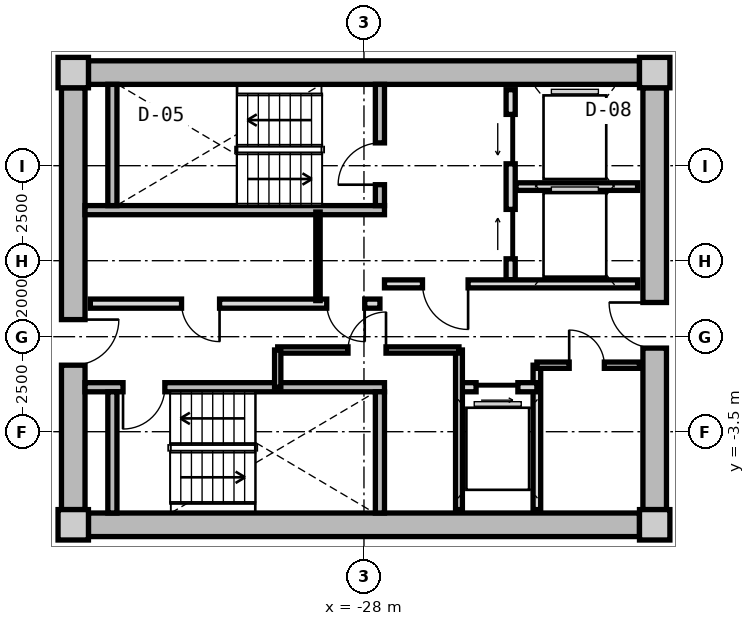
"""IFC4 building model, lengths in metres.
Left out: names, types, materials, properties, quantities, classifications, styles, units other than length and angle.
Written with IfcOpenShell. Run it as: python <this file> out.ifc"""

import sys

from ifc_helpers import new_model, si_unit, direction, frame, frame_2d, origin, origin_2d, place, context, subcontext, project, spatial, rectangle, extrude, source, transform, mapped, element, fill, save


model = new_model("IFC4")
c1 = context("Model", 3, precision=1e-05, world=origin(), true_north=direction((0.0, 1.0)))
c2 = subcontext(c1, "Body", "Model", "MODEL_VIEW")
j1 = project(units=[si_unit("LENGTHUNIT", "METRE"), si_unit("PLANEANGLEUNIT", "RADIAN")], contexts=[c1])
p1 = place(None, origin())
s1 = spatial("IfcSite", under=j1, at=p1, CompositionType="ELEMENT")
p2 = place(p1, origin())
s2 = spatial("IfcBuilding", under=s1, at=p2, CompositionType="ELEMENT")
p3 = place(p2, frame((0.0, 0.0, 173.95)))
s3 = spatial("IfcBuildingStorey", under=s2, at=p3, CompositionType="ELEMENT", Elevation=173.95)
m1 = source(origin(), c2, "Body", "SweptSolid", [
    extrude(rectangle(XDim=0.8, YDim=0.8, at=origin_2d()), origin(), (0.0, 0.0, 1.0), 3.05),
])
for number, where, z_axis, x_axis in (
    (1, (-35.65, -5.95, 0.0), (0.0, 0.0, 1.0), (1.0, 0.0, 0.0)),
    (2, (-20.35, -5.95, 0.0), (0.0, 0.0, 1.0), (1.0, 0.0, 0.0)),
    (3, (-20.35, 5.95, 0.0), (0.0, 0.0, 1.0), (1.0, 0.0, 0.0)),
    (4, (-35.65, 5.95, 0.0), (0.0, 0.0, 1.0), (1.0, 0.0, 0.0)),
):
    element("IfcColumn", number, at=place(p3, frame(where, z_axis=z_axis, x_axis=x_axis)), inside=s3, PredefinedType="COLUMN", context=c2, shape_type="MappedRepresentation", body=[
        mapped(m1, transform((0.0, 0.0, 0.0), x_axis=(1.0, 0.0, 0.0), y_axis=(0.0, 1.0, 0.0), z_axis=(0.0, 0.0, 1.0), scale=1.0)),
    ])
m2 = source(origin(), c2, "Body", "SweptSolid", [
    extrude(rectangle(XDim=14.5, YDim=0.62, at=frame_2d((7.25, 0.0))), origin(), (0.0, 0.0, 1.0), 2.81),
])
for number, where, z_axis, x_axis in (
    (5, (-35.25, 5.95, 0.0), (0.0, 0.0, 1.0), (1.0, 0.0, 0.0)),
    (6, (-20.75, -5.95, 0.0), (0.0, 0.0, 1.0), (-1.0, 0.0, 0.0)),
):
    element("IfcWall", number, at=place(p3, frame(where, z_axis=z_axis, x_axis=x_axis)), inside=s3, PredefinedType="SHEAR", context=c2, shape_type="MappedRepresentation", body=[
        mapped(m2, transform((0.0, 0.0, 0.0), x_axis=(1.0, 0.0, 0.0), y_axis=(0.0, 1.0, 0.0), z_axis=(0.0, 0.0, 1.0), scale=1.0)),
    ])
m3 = source(origin(), c2, "Body", "SweptSolid", [
    extrude(rectangle(XDim=11.1, YDim=0.62, at=frame_2d((5.55, 0.0))), origin(), (0.0, 0.0, 1.0), 2.81),
])
p4 = place(p3, frame((-35.65, -5.55, 0.0), z_axis=(0.0, 0.0, 1.0), x_axis=(0.0, 1.0, 0.0)))
e7 = element("IfcWall", 7, at=p4, inside=s3, PredefinedType="SHEAR", context=c2, shape_type="MappedRepresentation", body=[
    mapped(m3, transform((0.0, 0.0, 0.0), x_axis=(1.0, 0.0, 0.0), y_axis=(0.0, 1.0, 0.0), z_axis=(0.0, 0.0, 1.0), scale=1.0)),
])
p5 = place(p4, frame((3.8, 0.0, 0.0)))
e8 = element("IfcOpeningElement", 8, at=p5, cuts=e7, PredefinedType="OPENING", context=c2, shape_type="SweptSolid", body=[
    extrude(rectangle(XDim=1.2, YDim=2.15, at=frame_2d((0.6, 1.075))), frame((0.0, 0.32, 0.0), z_axis=(0.0, -1.0, 0.0), x_axis=(1.0, 0.0, 0.0)), (0.0, 0.0, 1.0), 0.64),
])
p6 = place(p3, frame((-20.35, 5.55, 0.0), z_axis=(0.0, 0.0, 1.0), x_axis=(0.0, -1.0, 0.0)))
e9 = element("IfcWall", 9, at=p6, inside=s3, PredefinedType="SHEAR", context=c2, shape_type="MappedRepresentation", body=[
    mapped(m3, transform((0.0, 0.0, 0.0), x_axis=(1.0, 0.0, 0.0), y_axis=(0.0, 1.0, 0.0), z_axis=(0.0, 0.0, 1.0), scale=1.0)),
])
p7 = place(p6, frame((5.65, 0.0, 0.0)))
e10 = element("IfcOpeningElement", 10, at=p7, cuts=e9, PredefinedType="OPENING", context=c2, shape_type="SweptSolid", body=[
    extrude(rectangle(XDim=1.2, YDim=2.15, at=frame_2d((0.6, 1.075))), frame((0.0, 0.32, 0.0), z_axis=(0.0, -1.0, 0.0), x_axis=(1.0, 0.0, 0.0)), (0.0, 0.0, 1.0), 0.64),
])
m4 = source(origin(), c2, "Body", "SweptSolid", [
    extrude(rectangle(XDim=7.88, YDim=0.24, at=frame_2d((3.94, 0.0))), origin(), (0.0, 0.0, 1.0), 2.81),
])
p8 = place(p3, frame((-35.34, 2.33, 0.0), z_axis=(0.0, 0.0, 1.0), x_axis=(1.0, 0.0, 0.0)))
e11 = element("IfcWall", 11, at=p8, inside=s3, PredefinedType="PARTITIONING", context=c2, shape_type="MappedRepresentation", body=[
    mapped(m4, transform((0.0, 0.0, 0.0), x_axis=(1.0, 0.0, 0.0), y_axis=(0.0, 1.0, 0.0), z_axis=(0.0, 0.0, 1.0), scale=1.0)),
])
m5 = source(origin(), c2, "Body", "SweptSolid", [
    extrude(rectangle(XDim=3.19, YDim=0.24, at=frame_2d((1.595, 0.0))), origin(), (0.0, 0.0, 1.0), 2.81),
])
p9 = place(p3, frame((-34.62, 2.45, 0.0), z_axis=(0.0, 0.0, 1.0), x_axis=(0.0, 1.0, 0.0)))
e12 = element("IfcWall", 12, at=p9, inside=s3, PredefinedType="PARTITIONING", context=c2, shape_type="MappedRepresentation", body=[
    mapped(m5, transform((0.0, 0.0, 0.0), x_axis=(1.0, 0.0, 0.0), y_axis=(0.0, 1.0, 0.0), z_axis=(0.0, 0.0, 1.0), scale=1.0)),
])
p10 = place(p3, frame((-27.58, 2.45, 0.0), z_axis=(0.0, 0.0, 1.0), x_axis=(0.0, 1.0, 0.0)))
e13 = element("IfcWall", 13, at=p10, inside=s3, PredefinedType="PARTITIONING", context=c2, shape_type="MappedRepresentation", body=[
    mapped(m5, transform((0.0, 0.0, 0.0), x_axis=(1.0, 0.0, 0.0), y_axis=(0.0, 1.0, 0.0), z_axis=(0.0, 0.0, 1.0), scale=1.0)),
])
p11 = place(p10, frame((0.55, 0.0, 0.0)))
e14 = element("IfcOpeningElement", 14, at=p11, cuts=e13, PredefinedType="OPENING", context=c2, shape_type="SweptSolid", body=[
    extrude(rectangle(XDim=1.1, YDim=2.15, at=frame_2d((0.55, 1.075))), frame((0.0, 0.13, 0.0), z_axis=(0.0, -1.0, 0.0), x_axis=(1.0, 0.0, 0.0)), (0.0, 0.0, 1.0), 0.26),
])
p12 = place(p3, frame((-35.34, -2.33, 0.0), z_axis=(0.0, 0.0, 1.0), x_axis=(1.0, 0.0, 0.0)))
e15 = element("IfcWall", 15, at=p12, inside=s3, PredefinedType="PARTITIONING", context=c2, shape_type="MappedRepresentation", body=[
    mapped(m4, transform((0.0, 0.0, 0.0), x_axis=(1.0, 0.0, 0.0), y_axis=(0.0, 1.0, 0.0), z_axis=(0.0, 0.0, 1.0), scale=1.0)),
])
p13 = place(p12, frame((1.0, 0.0, 0.0)))
e16 = element("IfcOpeningElement", 16, at=p13, cuts=e15, PredefinedType="OPENING", context=c2, shape_type="SweptSolid", body=[
    extrude(rectangle(XDim=1.1, YDim=2.15, at=frame_2d((0.55, 1.075))), frame((0.0, 0.13, 0.0), z_axis=(0.0, -1.0, 0.0), x_axis=(1.0, 0.0, 0.0)), (0.0, 0.0, 1.0), 0.26),
])
for number, where, z_axis, x_axis in (
    (17, (-34.62, -5.64, 0.0), (0.0, 0.0, 1.0), (0.0, 1.0, 0.0)),
    (18, (-27.58, -5.64, 0.0), (0.0, 0.0, 1.0), (0.0, 1.0, 0.0)),
):
    element("IfcWall", number, at=place(p3, frame(where, z_axis=z_axis, x_axis=x_axis)), inside=s3, PredefinedType="PARTITIONING", context=c2, shape_type="MappedRepresentation", body=[
        mapped(m5, transform((0.0, 0.0, 0.0), x_axis=(1.0, 0.0, 0.0), y_axis=(0.0, 1.0, 0.0), z_axis=(0.0, 0.0, 1.0), scale=1.0)),
    ])
m6 = source(origin(), c2, "Body", "SweptSolid", [
    extrude(rectangle(XDim=5.0, YDim=0.24, at=frame_2d((2.5, 0.0))), origin(), (0.0, 0.0, 1.0), 2.795),
])
p14 = place(p3, frame((-24.14, 0.5, 0.0), z_axis=(0.0, 0.0, 1.0), x_axis=(0.0, 1.0, 0.0)))
e19 = element("IfcWall", 19, at=p14, inside=s3, PredefinedType="PARTITIONING", context=c2, shape_type="MappedRepresentation", body=[
    mapped(m6, transform((0.0, 0.0, 0.0), x_axis=(1.0, 0.0, 0.0), y_axis=(0.0, 1.0, 0.0), z_axis=(0.0, 0.0, 1.0), scale=1.0)),
])
p15 = place(p14, frame((3.05, 0.0, 0.0)))
e20 = element("IfcOpeningElement", 20, at=p15, cuts=e19, PredefinedType="OPENING", context=c2, shape_type="SweptSolid", body=[
    extrude(rectangle(XDim=1.3, YDim=2.2, at=frame_2d((0.65, 1.1))), frame((0.0, 0.13, 0.0), z_axis=(0.0, -1.0, 0.0), x_axis=(1.0, 0.0, 0.0)), (0.0, 0.0, 1.0), 0.26),
])
p16 = place(p14, frame((0.55, 0.0, 0.0)))
e21 = element("IfcOpeningElement", 21, at=p16, cuts=e19, PredefinedType="OPENING", context=c2, shape_type="SweptSolid", body=[
    extrude(rectangle(XDim=1.3, YDim=2.2, at=frame_2d((0.65, 1.1))), frame((0.0, 0.13, 0.0), z_axis=(0.0, -1.0, 0.0), x_axis=(1.0, 0.0, 0.0)), (0.0, 0.0, 1.0), 0.26),
])
m7 = source(origin(), c2, "Body", "SweptSolid", [
    extrude(rectangle(XDim=3.2, YDim=0.2, at=frame_2d((1.6, 0.0))), origin(), (0.0, 0.0, 1.0), 2.795),
])
p17 = place(p3, frame((-24.0, 2.95, 0.0), z_axis=(0.0, 0.0, 1.0), x_axis=(1.0, 0.0, 0.0)))
e22 = element("IfcWall", 22, at=p17, inside=s3, PredefinedType="PARTITIONING", context=c2, shape_type="MappedRepresentation", body=[
    mapped(m7, transform((0.0, 0.0, 0.0), x_axis=(1.0, 0.0, 0.0), y_axis=(0.0, 1.0, 0.0), z_axis=(0.0, 0.0, 1.0), scale=1.0)),
])
m8 = source(origin(), c2, "Body", "SweptSolid", [
    extrude(rectangle(XDim=6.66, YDim=0.21, at=frame_2d((3.33, 0.0))), origin(), (0.0, 0.0, 1.0), 2.795),
])
p18 = place(p3, frame((-27.46, 0.39, 0.0), z_axis=(0.0, 0.0, 1.0), x_axis=(1.0, 0.0, 0.0)))
e23 = element("IfcWall", 23, at=p18, inside=s3, PredefinedType="PARTITIONING", context=c2, shape_type="MappedRepresentation", body=[
    mapped(m8, transform((0.0, 0.0, 0.0), x_axis=(1.0, 0.0, 0.0), y_axis=(0.0, 1.0, 0.0), z_axis=(0.0, 0.0, 1.0), scale=1.0)),
])
p19 = place(p18, frame((1.0, 0.0, 0.0)))
e24 = element("IfcOpeningElement", 24, at=p19, cuts=e23, PredefinedType="OPENING", context=c2, shape_type="SweptSolid", body=[
    extrude(rectangle(XDim=1.2, YDim=2.15, at=frame_2d((0.6, 1.075))), frame((0.0, 0.115, 0.0), z_axis=(0.0, -1.0, 0.0), x_axis=(1.0, 0.0, 0.0)), (0.0, 0.0, 1.0), 0.23),
])
m9 = source(origin(), c2, "Body", "SweptSolid", [
    extrude(rectangle(XDim=7.62, YDim=0.24, at=frame_2d((3.81, 0.0))), origin(), (0.0, 0.0, 1.0), 2.795),
])
p20 = place(p3, frame((-35.2, -0.13, 0.0), z_axis=(0.0, 0.0, 1.0), x_axis=(1.0, 0.0, 0.0)))
e25 = element("IfcWall", 25, at=p20, inside=s3, PredefinedType="PARTITIONING", context=c2, shape_type="MappedRepresentation", body=[
    mapped(m9, transform((0.0, 0.0, 0.0), x_axis=(1.0, 0.0, 0.0), y_axis=(0.0, 1.0, 0.0), z_axis=(0.0, 0.0, 1.0), scale=1.0)),
])
p21 = place(p20, frame((6.22, 0.0, 0.0)))
e26 = element("IfcOpeningElement", 26, at=p21, cuts=e25, PredefinedType="OPENING", context=c2, shape_type="SweptSolid", body=[
    extrude(rectangle(XDim=1.0, YDim=2.1, at=frame_2d((0.5, 1.05))), frame((0.0, 0.13, 0.0), z_axis=(0.0, -1.0, 0.0), x_axis=(1.0, 0.0, 0.0)), (0.0, 0.0, 1.0), 0.26),
])
p22 = place(p20, frame((2.4, 0.0, 0.0)))
e27 = element("IfcOpeningElement", 27, at=p22, cuts=e25, PredefinedType="OPENING", context=c2, shape_type="SweptSolid", body=[
    extrude(rectangle(XDim=1.0, YDim=2.1, at=frame_2d((0.5, 1.05))), frame((0.0, 0.13, 0.0), z_axis=(0.0, -1.0, 0.0), x_axis=(1.0, 0.0, 0.0)), (0.0, 0.0, 1.0), 0.26),
])
m10 = source(origin(), c2, "Body", "SweptSolid", [
    extrude(rectangle(XDim=2.33, YDim=0.115, at=frame_2d((1.165, 0.0))), origin(), (0.0, 0.0, 1.0), 2.795),
])
p23 = place(p3, frame((-29.21, -0.05, 0.0), z_axis=(0.0, 0.0, 1.0), x_axis=(0.0, 1.0, 0.0)))
e28 = element("IfcWall", 28, at=p23, inside=s3, PredefinedType="PARTITIONING", context=c2, shape_type="MappedRepresentation", body=[
    mapped(m10, transform((0.0, 0.0, 0.0), x_axis=(1.0, 0.0, 0.0), y_axis=(0.0, 1.0, 0.0), z_axis=(0.0, 0.0, 1.0), scale=1.0)),
])
m11 = source(origin(), c2, "Body", "SweptSolid", [
    extrude(rectangle(XDim=3.8, YDim=0.2, at=frame_2d((1.9, 0.0))), origin(), (0.0, 0.0, 1.0), 2.795),
])
p24 = place(p3, frame((-23.45, -5.55, 0.0), z_axis=(0.0, 0.0, 1.0), x_axis=(0.0, 1.0, 0.0)))
e29 = element("IfcWall", 29, at=p24, inside=s3, PredefinedType="PARTITIONING", context=c2, shape_type="MappedRepresentation", body=[
    mapped(m11, transform((0.0, 0.0, 0.0), x_axis=(1.0, 0.0, 0.0), y_axis=(0.0, 1.0, 0.0), z_axis=(0.0, 0.0, 1.0), scale=1.0)),
])
m12 = source(origin(), c2, "Body", "SweptSolid", [
    extrude(rectangle(XDim=2.05, YDim=0.24, at=frame_2d((1.025, 0.0))), origin(), (0.0, 0.0, 1.0), 2.795),
])
p25 = place(p3, frame((-25.5, -2.33, 0.0), z_axis=(0.0, 0.0, 1.0), x_axis=(1.0, 0.0, 0.0)))
e30 = element("IfcWall", 30, at=p25, inside=s3, PredefinedType="PARTITIONING", context=c2, shape_type="MappedRepresentation", body=[
    mapped(m12, transform((0.0, 0.0, 0.0), x_axis=(1.0, 0.0, 0.0), y_axis=(0.0, 1.0, 0.0), z_axis=(0.0, 0.0, 1.0), scale=1.0)),
])
p26 = place(p25, frame((0.45, 0.0, 0.0)))
e31 = element("IfcOpeningElement", 31, at=p26, cuts=e30, PredefinedType="OPENING", context=c2, shape_type="SweptSolid", body=[
    extrude(rectangle(XDim=1.1, YDim=2.2, at=frame_2d((0.55, 1.1))), frame((0.0, 0.13, 0.0), z_axis=(0.0, -1.0, 0.0), x_axis=(1.0, 0.0, 0.0)), (0.0, 0.0, 1.0), 0.26),
])
m13 = source(origin(), c2, "Body", "SweptSolid", [
    extrude(rectangle(XDim=4.2, YDim=0.18, at=frame_2d((2.1, 0.0))), origin(), (0.0, 0.0, 1.0), 2.795),
])
p27 = place(p3, frame((-25.5, -5.55, 0.0), z_axis=(0.0, 0.0, 1.0), x_axis=(0.0, 1.0, 0.0)))
e32 = element("IfcWall", 32, at=p27, inside=s3, PredefinedType="PARTITIONING", context=c2, shape_type="MappedRepresentation", body=[
    mapped(m13, transform((0.0, 0.0, 0.0), x_axis=(1.0, 0.0, 0.0), y_axis=(0.0, 1.0, 0.0), z_axis=(0.0, 0.0, 1.0), scale=1.0)),
])
m14 = source(origin(), c2, "Body", "SweptSolid", [
    extrude(rectangle(XDim=4.77, YDim=0.165, at=frame_2d((2.385, 0.0))), origin(), (0.0, 0.0, 1.0), 2.795),
])
p28 = place(p3, frame((-30.27, -1.35, 0.0), z_axis=(0.0, 0.0, 1.0), x_axis=(1.0, 0.0, 0.0)))
e33 = element("IfcWall", 33, at=p28, inside=s3, PredefinedType="PARTITIONING", context=c2, shape_type="MappedRepresentation", body=[
    mapped(m14, transform((0.0, 0.0, 0.0), x_axis=(1.0, 0.0, 0.0), y_axis=(0.0, 1.0, 0.0), z_axis=(0.0, 0.0, 1.0), scale=1.0)),
])
p29 = place(p28, frame((1.85, 0.0, 0.0)))
e34 = element("IfcOpeningElement", 34, at=p29, cuts=e33, PredefinedType="OPENING", context=c2, shape_type="SweptSolid", body=[
    extrude(rectangle(XDim=1.0, YDim=2.1, at=frame_2d((0.5, 1.05))), frame((0.0, 0.093, 0.0), z_axis=(0.0, -1.0, 0.0), x_axis=(1.0, 0.0, 0.0)), (0.0, 0.0, 1.0), 0.185),
])
m15 = source(origin(), c2, "Body", "SweptSolid", [
    extrude(rectangle(XDim=0.98, YDim=0.165, at=frame_2d((0.49, 0.0))), origin(), (0.0, 0.0, 1.0), 2.795),
])
p30 = place(p3, frame((-30.27, -2.33, 0.0), z_axis=(0.0, 0.0, 1.0), x_axis=(0.0, 1.0, 0.0)))
e35 = element("IfcWall", 35, at=p30, inside=s3, PredefinedType="PARTITIONING", context=c2, shape_type="MappedRepresentation", body=[
    mapped(m15, transform((0.0, 0.0, 0.0), x_axis=(1.0, 0.0, 0.0), y_axis=(0.0, 1.0, 0.0), z_axis=(0.0, 0.0, 1.0), scale=1.0)),
])
m16 = source(origin(), c2, "Body", "SweptSolid", [
    extrude(rectangle(XDim=2.7, YDim=0.165, at=frame_2d((1.35, 0.0))), origin(), (0.0, 0.0, 1.0), 2.795),
])
p31 = place(p3, frame((-23.45, -1.75, 0.0), z_axis=(0.0, 0.0, 1.0), x_axis=(1.0, 0.0, 0.0)))
e36 = element("IfcWall", 36, at=p31, inside=s3, PredefinedType="PARTITIONING", context=c2, shape_type="MappedRepresentation", body=[
    mapped(m16, transform((0.0, 0.0, 0.0), x_axis=(1.0, 0.0, 0.0), y_axis=(0.0, 1.0, 0.0), z_axis=(0.0, 0.0, 1.0), scale=1.0)),
])
p32 = place(p31, frame((0.85, 0.0, 0.0)))
e37 = element("IfcOpeningElement", 37, at=p32, cuts=e36, PredefinedType="OPENING", context=c2, shape_type="SweptSolid", body=[
    extrude(rectangle(XDim=0.925, YDim=2.1, at=frame_2d((0.462, 1.05))), frame((0.0, 0.093, 0.0), z_axis=(0.0, -1.0, 0.0), x_axis=(1.0, 0.0, 0.0)), (0.0, 0.0, 1.0), 0.185),
])
m17 = source(origin(), c2, "Body", "SweptSolid", [
    extrude(rectangle(XDim=1.1, YDim=2.15, at=frame_2d((0.55, 1.075))), frame((0.0, 0.025, 0.0), z_axis=(0.0, -1.0, 0.0), x_axis=(1.0, 0.0, 0.0)), (0.0, 0.0, 1.0), 0.05),
])
p33 = place(p11, origin())
e38 = element("IfcDoor", 38, at=p33, inside=s3, OperationType="SINGLE_SWING_LEFT", PredefinedType="DOOR", context=c2, shape_type="MappedRepresentation", body=[
    mapped(m17, transform((0.0, 0.0, 0.0), x_axis=(1.0, 0.0, 0.0), y_axis=(0.0, 1.0, 0.0), z_axis=(0.0, 0.0, 1.0), scale=1.0)),
])
fill(e14, e38)
p34 = place(p13, frame((1.1, 0.0, 0.0), z_axis=(0.0, 0.0, 1.0), x_axis=(-1.0, 0.0, 0.0)))
e39 = element("IfcDoor", 39, at=p34, inside=s3, OperationType="SINGLE_SWING_RIGHT", PredefinedType="DOOR", context=c2, shape_type="MappedRepresentation", body=[
    mapped(m17, transform((0.0, 0.0, 0.0), x_axis=(1.0, 0.0, 0.0), y_axis=(0.0, 1.0, 0.0), z_axis=(0.0, 0.0, 1.0), scale=1.0)),
])
fill(e16, e39)
m18 = source(origin(), c2, "Body", "SweptSolid", [
    extrude(rectangle(XDim=1.3, YDim=2.2, at=frame_2d((0.65, 1.1))), frame((0.0, 0.025, 0.0), z_axis=(0.0, -1.0, 0.0), x_axis=(1.0, 0.0, 0.0)), (0.0, 0.0, 1.0), 0.05),
])
p35 = place(p15, origin())
e40 = element("IfcDoor", 40, at=p35, inside=s3, OperationType="SLIDING_TO_LEFT", PredefinedType="DOOR", context=c2, shape_type="MappedRepresentation", body=[
    mapped(m18, transform((0.0, 0.0, 0.0), x_axis=(1.0, 0.0, 0.0), y_axis=(0.0, 1.0, 0.0), z_axis=(0.0, 0.0, 1.0), scale=1.0)),
])
fill(e20, e40)
p36 = place(p16, origin())
e41 = element("IfcDoor", 41, at=p36, inside=s3, OperationType="SLIDING_TO_RIGHT", PredefinedType="DOOR", context=c2, shape_type="MappedRepresentation", body=[
    mapped(m18, transform((0.0, 0.0, 0.0), x_axis=(1.0, 0.0, 0.0), y_axis=(0.0, 1.0, 0.0), z_axis=(0.0, 0.0, 1.0), scale=1.0)),
])
fill(e21, e41)
m19 = source(origin(), c2, "Body", "SweptSolid", [
    extrude(rectangle(XDim=1.2, YDim=2.15, at=frame_2d((0.6, 1.075))), frame((0.0, 0.025, 0.0), z_axis=(0.0, -1.0, 0.0), x_axis=(1.0, 0.0, 0.0)), (0.0, 0.0, 1.0), 0.05),
])
p37 = place(p19, frame((1.2, 0.0, 0.0), z_axis=(0.0, 0.0, 1.0), x_axis=(-1.0, 0.0, 0.0)))
e42 = element("IfcDoor", 42, at=p37, inside=s3, OperationType="SINGLE_SWING_LEFT", PredefinedType="DOOR", context=c2, shape_type="MappedRepresentation", body=[
    mapped(m19, transform((0.0, 0.0, 0.0), x_axis=(1.0, 0.0, 0.0), y_axis=(0.0, 1.0, 0.0), z_axis=(0.0, 0.0, 1.0), scale=1.0)),
])
fill(e24, e42)
p38 = place(p5, frame((1.2, 0.0, 0.0), z_axis=(0.0, 0.0, 1.0), x_axis=(-1.0, 0.0, 0.0)))
e43 = element("IfcDoor", 43, at=p38, inside=s3, OperationType="SINGLE_SWING_LEFT", PredefinedType="DOOR", context=c2, shape_type="MappedRepresentation", body=[
    mapped(m19, transform((0.0, 0.0, 0.0), x_axis=(1.0, 0.0, 0.0), y_axis=(0.0, 1.0, 0.0), z_axis=(0.0, 0.0, 1.0), scale=1.0)),
])
fill(e8, e43)
p39 = place(p7, frame((1.2, 0.0, 0.0), z_axis=(0.0, 0.0, 1.0), x_axis=(-1.0, 0.0, 0.0)))
e44 = element("IfcDoor", 44, at=p39, inside=s3, OperationType="SINGLE_SWING_RIGHT", PredefinedType="DOOR", context=c2, shape_type="MappedRepresentation", body=[
    mapped(m19, transform((0.0, 0.0, 0.0), x_axis=(1.0, 0.0, 0.0), y_axis=(0.0, 1.0, 0.0), z_axis=(0.0, 0.0, 1.0), scale=1.0)),
])
fill(e10, e44)
m20 = source(origin(), c2, "Body", "SweptSolid", [
    extrude(rectangle(XDim=1.0, YDim=2.1, at=frame_2d((0.5, 1.05))), frame((0.0, 0.025, 0.0), z_axis=(0.0, -1.0, 0.0), x_axis=(1.0, 0.0, 0.0)), (0.0, 0.0, 1.0), 0.05),
])
p40 = place(p21, frame((1.0, 0.0, 0.0), z_axis=(0.0, 0.0, 1.0), x_axis=(-1.0, 0.0, 0.0)))
e45 = element("IfcDoor", 45, at=p40, inside=s3, OperationType="SINGLE_SWING_LEFT", PredefinedType="DOOR", context=c2, shape_type="MappedRepresentation", body=[
    mapped(m20, transform((0.0, 0.0, 0.0), x_axis=(1.0, 0.0, 0.0), y_axis=(0.0, 1.0, 0.0), z_axis=(0.0, 0.0, 1.0), scale=1.0)),
])
fill(e26, e45)
p41 = place(p22, frame((1.0, 0.0, 0.0), z_axis=(0.0, 0.0, 1.0), x_axis=(-1.0, 0.0, 0.0)))
e46 = element("IfcDoor", 46, at=p41, inside=s3, OperationType="SINGLE_SWING_LEFT", PredefinedType="DOOR", context=c2, shape_type="MappedRepresentation", body=[
    mapped(m20, transform((0.0, 0.0, 0.0), x_axis=(1.0, 0.0, 0.0), y_axis=(0.0, 1.0, 0.0), z_axis=(0.0, 0.0, 1.0), scale=1.0)),
])
fill(e27, e46)
m21 = source(origin(), c2, "Body", "SweptSolid", [
    extrude(rectangle(XDim=1.1, YDim=2.2, at=frame_2d((0.55, 1.1))), frame((0.0, 0.025, 0.0), z_axis=(0.0, -1.0, 0.0), x_axis=(1.0, 0.0, 0.0)), (0.0, 0.0, 1.0), 0.05),
])
p42 = place(p26, frame((1.1, 0.0, 0.0), z_axis=(0.0, 0.0, 1.0), x_axis=(-1.0, 0.0, 0.0)))
e47 = element("IfcDoor", 47, at=p42, inside=s3, OperationType="SLIDING_TO_RIGHT", PredefinedType="DOOR", context=c2, shape_type="MappedRepresentation", body=[
    mapped(m21, transform((0.0, 0.0, 0.0), x_axis=(1.0, 0.0, 0.0), y_axis=(0.0, 1.0, 0.0), z_axis=(0.0, 0.0, 1.0), scale=1.0)),
])
fill(e31, e47)
p43 = place(p29, origin())
e48 = element("IfcDoor", 48, at=p43, inside=s3, OperationType="SINGLE_SWING_RIGHT", PredefinedType="DOOR", context=c2, shape_type="MappedRepresentation", body=[
    mapped(m20, transform((0.0, 0.0, 0.0), x_axis=(1.0, 0.0, 0.0), y_axis=(0.0, 1.0, 0.0), z_axis=(0.0, 0.0, 1.0), scale=1.0)),
])
fill(e34, e48)
m22 = source(origin(), c2, "Body", "SweptSolid", [
    extrude(rectangle(XDim=0.925, YDim=2.1, at=frame_2d((0.462, 1.05))), frame((0.0, 0.025, 0.0), z_axis=(0.0, -1.0, 0.0), x_axis=(1.0, 0.0, 0.0)), (0.0, 0.0, 1.0), 0.05),
])
p44 = place(p32, origin())
e49 = element("IfcDoor", 49, at=p44, inside=s3, OperationType="SINGLE_SWING_LEFT", PredefinedType="DOOR", context=c2, shape_type="MappedRepresentation", body=[
    mapped(m22, transform((0.0, 0.0, 0.0), x_axis=(1.0, 0.0, 0.0), y_axis=(0.0, 1.0, 0.0), z_axis=(0.0, 0.0, 1.0), scale=1.0)),
])
fill(e37, e49)
save(model, sys.argv[1])
